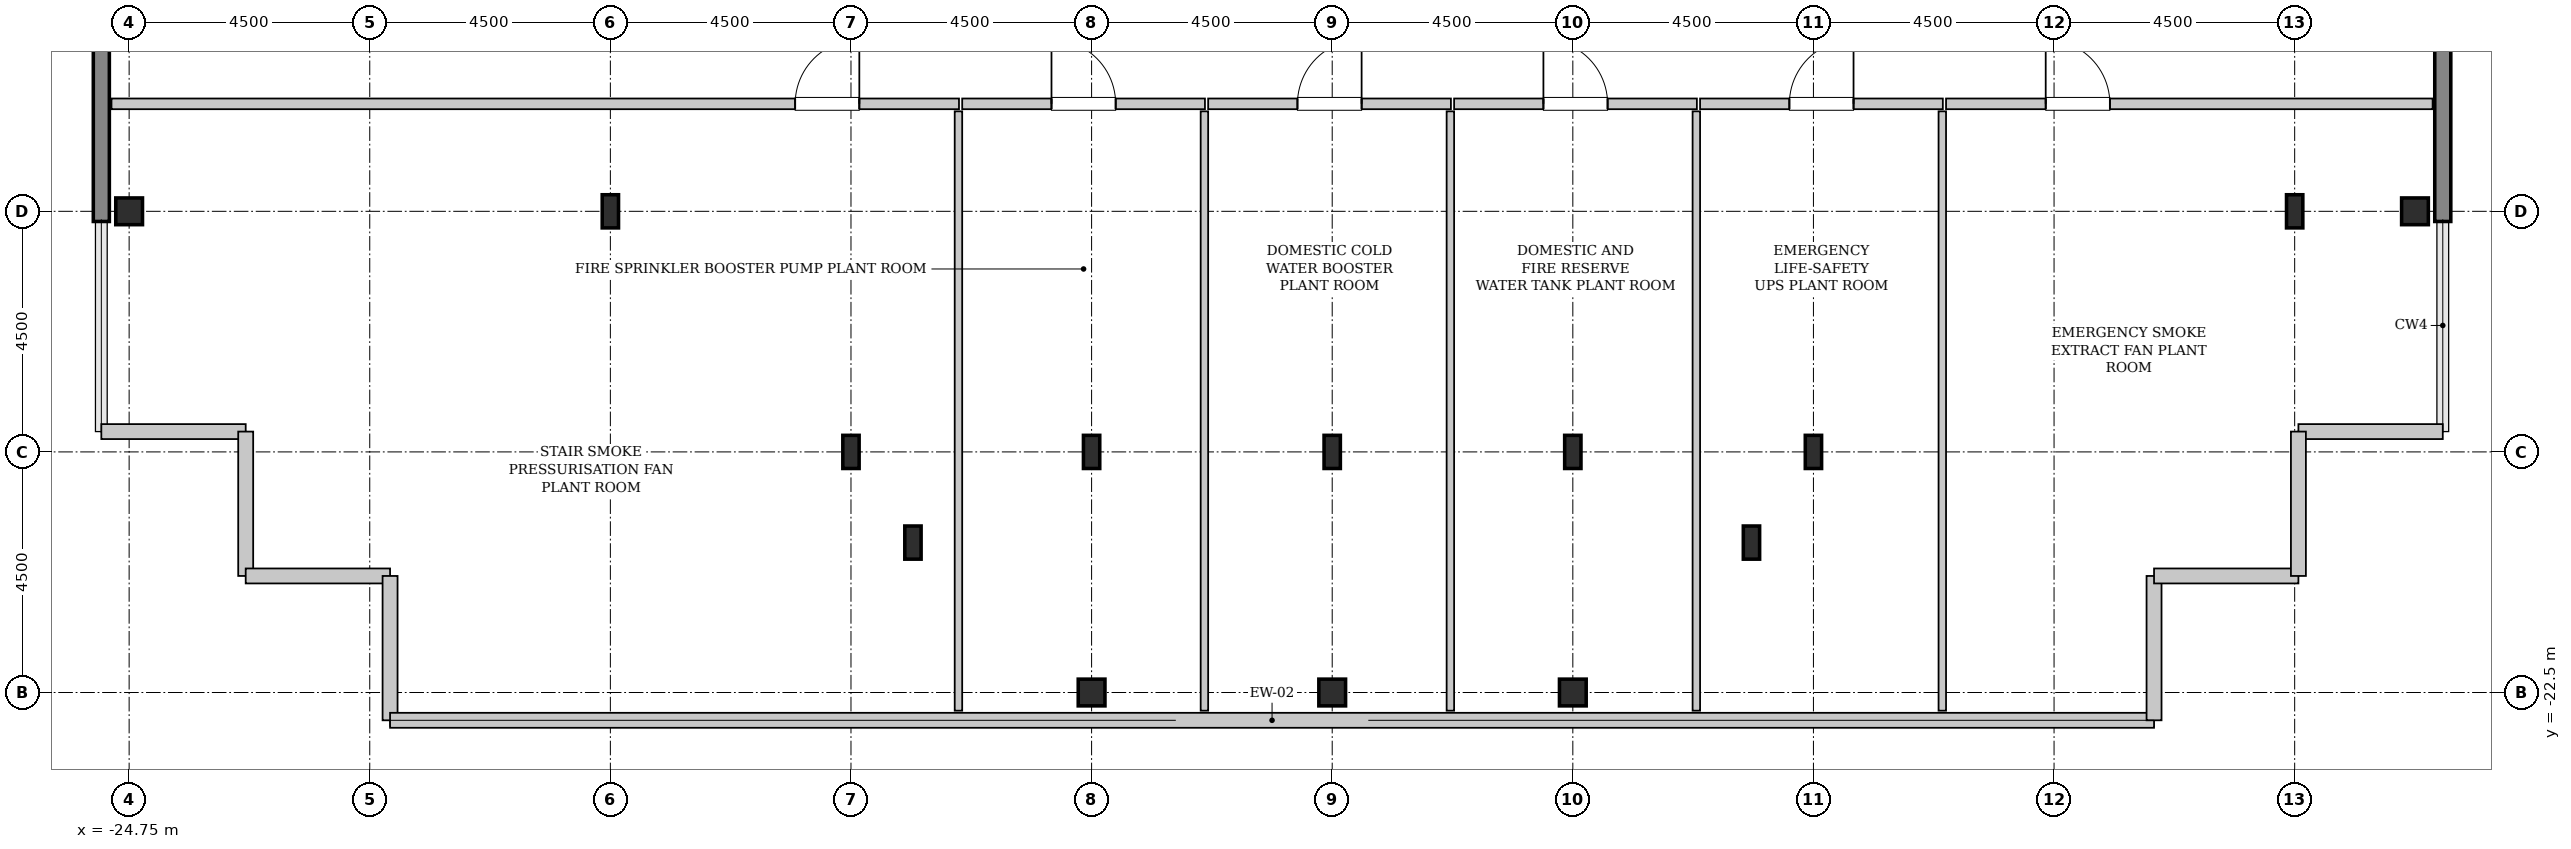
"""IFC4 building model, lengths in metres.
Left out: names, types, materials, properties, quantities, classifications, styles, units other than length and angle.
Written with IfcOpenShell. Run it as: python <this file> out.ifc"""

import sys

from ifc_helpers import new_model, si_unit, direction, frame, frame_2d, origin, origin_2d, place, context, subcontext, project, spatial, rectangle, hollow_rectangle, i_section, extrude, source, transform, mapped, element, fill, save


model = new_model("IFC4")
c1 = context("Model", 3, precision=1e-05, world=origin(), true_north=direction((0.0, 1.0)))
c2 = subcontext(c1, "Body", "Model", "MODEL_VIEW")
j1 = project(units=[si_unit("LENGTHUNIT", "METRE"), si_unit("PLANEANGLEUNIT", "RADIAN")], contexts=[c1])
p1 = place(None, origin())
s1 = spatial("IfcSite", under=j1, at=p1, CompositionType="ELEMENT")
p2 = place(p1, origin())
s2 = spatial("IfcBuilding", under=s1, at=p2, CompositionType="ELEMENT")
p3 = place(p2, frame((0.0, 0.0, 317.8)))
s3 = spatial("IfcBuildingStorey", under=s2, at=p3, CompositionType="ELEMENT", Elevation=317.8)
m1 = source(origin(), c2, "Body", "SweptSolid", [
    extrude(hollow_rectangle(XDim=0.5, YDim=0.5, WallThickness=0.025, InnerFilletRadius=0.025, OuterFilletRadius=0.05, at=origin_2d()), origin(), (0.0, 0.0, 1.0), 4.6),
])
p4 = place(p3, frame((-24.75, -13.5, 0.0), z_axis=(0.0, 0.0, 1.0), x_axis=(1.0, 0.0, 0.0)))
e1 = element("IfcColumn", 1, at=p4, inside=s3, PredefinedType="COLUMN", context=c2, shape_type="MappedRepresentation", body=[
    mapped(m1, transform((0.0, 0.0, 0.0), x_axis=(1.0, 0.0, 0.0), y_axis=(0.0, 1.0, 0.0), z_axis=(0.0, 0.0, 1.0), scale=1.0)),
])
m2 = source(origin(), c2, "Body", "SweptSolid", [
    extrude(i_section(OverallWidth=0.305, OverallDepth=0.62, WebThickness=0.021, FlangeThickness=0.04, FilletRadius=0.027, at=origin_2d()), origin(), (0.0, 0.0, 1.0), 4.6),
])
for number, where, z_axis, x_axis in (
    (2, (-15.75, -13.5, 0.0), (0.0, 0.0, 1.0), (1.0, 0.0, 0.0)),
    (3, (-11.25, -18.0, 0.0), (0.0, 0.0, 1.0), (1.0, 0.0, 0.0)),
    (4, (-10.091, -19.696, 0.0), (0.0, 0.0, 1.0), (1.0, 0.0, 0.0)),
):
    element("IfcColumn", number, at=place(p3, frame(where, z_axis=z_axis, x_axis=x_axis)), inside=s3, PredefinedType="COLUMN", context=c2, shape_type="MappedRepresentation", body=[
        mapped(m2, transform((0.0, 0.0, 0.0), x_axis=(1.0, 0.0, 0.0), y_axis=(0.0, 1.0, 0.0), z_axis=(0.0, 0.0, 1.0), scale=1.0)),
    ])
p5 = place(p3, frame((-6.75, -22.5, 0.0), z_axis=(0.0, 0.0, 1.0), x_axis=(1.0, 0.0, 0.0)))
e5 = element("IfcColumn", 5, at=p5, inside=s3, PredefinedType="COLUMN", context=c2, shape_type="MappedRepresentation", body=[
    mapped(m1, transform((0.0, 0.0, 0.0), x_axis=(1.0, 0.0, 0.0), y_axis=(0.0, 1.0, 0.0), z_axis=(0.0, 0.0, 1.0), scale=1.0)),
])
p6 = place(p3, frame((-6.75, -18.0, 0.0), z_axis=(0.0, 0.0, 1.0), x_axis=(1.0, 0.0, 0.0)))
e6 = element("IfcColumn", 6, at=p6, inside=s3, PredefinedType="COLUMN", context=c2, shape_type="MappedRepresentation", body=[
    mapped(m2, transform((0.0, 0.0, 0.0), x_axis=(1.0, 0.0, 0.0), y_axis=(0.0, 1.0, 0.0), z_axis=(0.0, 0.0, 1.0), scale=1.0)),
])
p7 = place(p3, frame((-2.25, -22.5, 0.0), z_axis=(0.0, 0.0, 1.0), x_axis=(1.0, 0.0, 0.0)))
e7 = element("IfcColumn", 7, at=p7, inside=s3, PredefinedType="COLUMN", context=c2, shape_type="MappedRepresentation", body=[
    mapped(m1, transform((0.0, 0.0, 0.0), x_axis=(1.0, 0.0, 0.0), y_axis=(0.0, 1.0, 0.0), z_axis=(0.0, 0.0, 1.0), scale=1.0)),
])
p8 = place(p3, frame((-2.25, -18.0, 0.0), z_axis=(0.0, 0.0, 1.0), x_axis=(1.0, 0.0, 0.0)))
e8 = element("IfcColumn", 8, at=p8, inside=s3, PredefinedType="COLUMN", context=c2, shape_type="MappedRepresentation", body=[
    mapped(m2, transform((0.0, 0.0, 0.0), x_axis=(1.0, 0.0, 0.0), y_axis=(0.0, 1.0, 0.0), z_axis=(0.0, 0.0, 1.0), scale=1.0)),
])
p9 = place(p3, frame((2.25, -22.5, 0.0), z_axis=(0.0, 0.0, 1.0), x_axis=(1.0, 0.0, 0.0)))
e9 = element("IfcColumn", 9, at=p9, inside=s3, PredefinedType="COLUMN", context=c2, shape_type="MappedRepresentation", body=[
    mapped(m1, transform((0.0, 0.0, 0.0), x_axis=(1.0, 0.0, 0.0), y_axis=(0.0, 1.0, 0.0), z_axis=(0.0, 0.0, 1.0), scale=1.0)),
])
for number, where, z_axis, x_axis in (
    (10, (2.25, -18.0, 0.0), (0.0, 0.0, 1.0), (1.0, 0.0, 0.0)),
    (11, (5.591, -19.696, 0.0), (0.0, 0.0, 1.0), (1.0, 0.0, 0.0)),
    (12, (6.75, -18.0, 0.0), (0.0, 0.0, 1.0), (1.0, 0.0, 0.0)),
    (13, (15.75, -13.5, 0.0), (0.0, 0.0, 1.0), (1.0, 0.0, 0.0)),
):
    element("IfcColumn", number, at=place(p3, frame(where, z_axis=z_axis, x_axis=x_axis)), inside=s3, PredefinedType="COLUMN", context=c2, shape_type="MappedRepresentation", body=[
        mapped(m2, transform((0.0, 0.0, 0.0), x_axis=(1.0, 0.0, 0.0), y_axis=(0.0, 1.0, 0.0), z_axis=(0.0, 0.0, 1.0), scale=1.0)),
    ])
p10 = place(p3, frame((18.0, -13.5, 0.0), z_axis=(0.0, 0.0, 1.0), x_axis=(1.0, 0.0, 0.0)))
e14 = element("IfcColumn", 14, at=p10, inside=s3, PredefinedType="COLUMN", context=c2, shape_type="MappedRepresentation", body=[
    mapped(m1, transform((0.0, 0.0, 0.0), x_axis=(1.0, 0.0, 0.0), y_axis=(0.0, 1.0, 0.0), z_axis=(0.0, 0.0, 1.0), scale=1.0)),
])
m3 = source(origin(), c2, "Body", "SweptSolid", [
    extrude(rectangle(XDim=9.38, YDim=0.3, at=frame_2d((4.69, 0.0))), origin(), (0.0, 0.0, 1.0), 4.35),
])
for number, where, z_axis, x_axis in (
    (15, (-25.27, -13.69, 0.0), (0.0, 0.0, 1.0), (0.0, 1.0, 0.0)),
    (16, (18.52, -13.69, 0.0), (0.0, 0.0, 1.0), (0.0, 1.0, 0.0)),
):
    element("IfcWall", number, at=place(p3, frame(where, z_axis=z_axis, x_axis=x_axis)), inside=s3, PredefinedType="SHEAR", context=c2, shape_type="MappedRepresentation", body=[
        mapped(m3, transform((0.0, 0.0, 0.0), x_axis=(1.0, 0.0, 0.0), y_axis=(0.0, 1.0, 0.0), z_axis=(0.0, 0.0, 1.0), scale=1.0)),
    ])
m4 = source(origin(), c2, "Body", "SweptSolid", [
    extrude(rectangle(XDim=2.7, YDim=0.28, at=frame_2d((1.35, 0.0))), origin(), (0.0, 0.0, 1.0), 4.35),
])
for number, where, z_axis, x_axis in (
    (17, (15.82, -17.62, 0.0), (0.0, 0.0, 1.0), (1.0, 0.0, 0.0)),
    (18, (-25.27, -17.62, 0.0), (0.0, 0.0, 1.0), (1.0, 0.0, 0.0)),
    (19, (-22.57, -17.62, 0.0), (0.0, 0.0, 1.0), (0.0, -1.0, 0.0)),
    (20, (-22.57, -20.32, 0.0), (0.0, 0.0, 1.0), (1.0, 0.0, 0.0)),
    (21, (-19.87, -20.32, 0.0), (0.0, 0.0, 1.0), (0.0, -1.0, 0.0)),
):
    element("IfcWall", number, at=place(p3, frame(where, z_axis=z_axis, x_axis=x_axis)), inside=s3, PredefinedType="SOLIDWALL", context=c2, shape_type="MappedRepresentation", body=[
        mapped(m4, transform((0.0, 0.0, 0.0), x_axis=(1.0, 0.0, 0.0), y_axis=(0.0, 1.0, 0.0), z_axis=(0.0, 0.0, 1.0), scale=1.0)),
    ])
m5 = source(origin(), c2, "Body", "SweptSolid", [
    extrude(rectangle(XDim=32.99, YDim=0.28, at=frame_2d((16.495, 0.0))), origin(), (0.0, 0.0, 1.0), 1.1),
])
p11 = place(p3, frame((-19.87, -23.02, 0.0), z_axis=(0.0, 0.0, 1.0), x_axis=(1.0, 0.0, 0.0)))
e22 = element("IfcWall", 22, at=p11, inside=s3, PredefinedType="SOLIDWALL", context=c2, shape_type="MappedRepresentation", body=[
    mapped(m5, transform((0.0, 0.0, 0.0), x_axis=(1.0, 0.0, 0.0), y_axis=(0.0, 1.0, 0.0), z_axis=(0.0, 0.0, 1.0), scale=1.0)),
])
for number, where, z_axis, x_axis in (
    (23, (13.12, -23.02, 0.0), (0.0, 0.0, 1.0), (0.0, 1.0, 0.0)),
    (24, (13.12, -20.32, 0.0), (0.0, 0.0, 1.0), (1.0, 0.0, 0.0)),
    (25, (15.82, -20.32, 0.0), (0.0, 0.0, 1.0), (0.0, 1.0, 0.0)),
):
    element("IfcWall", number, at=place(p3, frame(where, z_axis=z_axis, x_axis=x_axis)), inside=s3, PredefinedType="SOLIDWALL", context=c2, shape_type="MappedRepresentation", body=[
        mapped(m4, transform((0.0, 0.0, 0.0), x_axis=(1.0, 0.0, 0.0), y_axis=(0.0, 1.0, 0.0), z_axis=(0.0, 0.0, 1.0), scale=1.0)),
    ])
m6 = source(origin(), c2, "Body", "SweptSolid", [
    extrude(rectangle(XDim=15.85, YDim=0.2, at=frame_2d((7.925, 0.0))), origin(), (0.0, 0.0, 1.0), 4.335),
])
p12 = place(p3, frame((-25.08, -11.49, 0.0), z_axis=(0.0, 0.0, 1.0), x_axis=(1.0, 0.0, 0.0)))
e26 = element("IfcWall", 26, at=p12, inside=s3, PredefinedType="SOLIDWALL", context=c2, shape_type="MappedRepresentation", body=[
    mapped(m6, transform((0.0, 0.0, 0.0), x_axis=(1.0, 0.0, 0.0), y_axis=(0.0, 1.0, 0.0), z_axis=(0.0, 0.0, 1.0), scale=1.0)),
])
p13 = place(p12, frame((12.786, 0.0, 0.0)))
e27 = element("IfcOpeningElement", 27, at=p13, cuts=e26, PredefinedType="OPENING", context=c2, shape_type="SweptSolid", body=[
    extrude(rectangle(XDim=1.2, YDim=2.15, at=frame_2d((0.6, 1.075))), frame((0.0, 0.11, 0.0), z_axis=(0.0, -1.0, 0.0), x_axis=(1.0, 0.0, 0.0)), (0.0, 0.0, 1.0), 0.22),
])
m7 = source(origin(), c2, "Body", "SweptSolid", [
    extrude(rectangle(XDim=11.21, YDim=0.14, at=frame_2d((5.605, 0.0))), origin(), (0.0, 0.0, 1.0), 4.335),
])
p14 = place(p3, frame((-9.24, -22.84, 0.0), z_axis=(0.0, 0.0, 1.0), x_axis=(0.0, 1.0, 0.0)))
e28 = element("IfcWall", 28, at=p14, inside=s3, PredefinedType="PARTITIONING", context=c2, shape_type="MappedRepresentation", body=[
    mapped(m7, transform((0.0, 0.0, 0.0), x_axis=(1.0, 0.0, 0.0), y_axis=(0.0, 1.0, 0.0), z_axis=(0.0, 0.0, 1.0), scale=1.0)),
])
m8 = source(origin(), c2, "Body", "SweptSolid", [
    extrude(rectangle(XDim=4.54, YDim=0.2, at=frame_2d((2.27, 0.0))), origin(), (0.0, 0.0, 1.0), 4.335),
])
p15 = place(p3, frame((-9.17, -11.49, 0.0), z_axis=(0.0, 0.0, 1.0), x_axis=(1.0, 0.0, 0.0)))
e29 = element("IfcWall", 29, at=p15, inside=s3, PredefinedType="SOLIDWALL", context=c2, shape_type="MappedRepresentation", body=[
    mapped(m8, transform((0.0, 0.0, 0.0), x_axis=(1.0, 0.0, 0.0), y_axis=(0.0, 1.0, 0.0), z_axis=(0.0, 0.0, 1.0), scale=1.0)),
])
p16 = place(p15, frame((1.67, 0.0, 0.0)))
e30 = element("IfcOpeningElement", 30, at=p16, cuts=e29, PredefinedType="OPENING", context=c2, shape_type="SweptSolid", body=[
    extrude(rectangle(XDim=1.2, YDim=2.15, at=frame_2d((0.6, 1.075))), frame((0.0, 0.11, 0.0), z_axis=(0.0, -1.0, 0.0), x_axis=(1.0, 0.0, 0.0)), (0.0, 0.0, 1.0), 0.22),
])
p17 = place(p3, frame((-4.64, -22.84, 0.0), z_axis=(0.0, 0.0, 1.0), x_axis=(0.0, 1.0, 0.0)))
e31 = element("IfcWall", 31, at=p17, inside=s3, PredefinedType="PARTITIONING", context=c2, shape_type="MappedRepresentation", body=[
    mapped(m7, transform((0.0, 0.0, 0.0), x_axis=(1.0, 0.0, 0.0), y_axis=(0.0, 1.0, 0.0), z_axis=(0.0, 0.0, 1.0), scale=1.0)),
])
p18 = place(p3, frame((-4.57, -11.49, 0.0), z_axis=(0.0, 0.0, 1.0), x_axis=(1.0, 0.0, 0.0)))
e32 = element("IfcWall", 32, at=p18, inside=s3, PredefinedType="SOLIDWALL", context=c2, shape_type="MappedRepresentation", body=[
    mapped(m8, transform((0.0, 0.0, 0.0), x_axis=(1.0, 0.0, 0.0), y_axis=(0.0, 1.0, 0.0), z_axis=(0.0, 0.0, 1.0), scale=1.0)),
])
p19 = place(p18, frame((1.67, 0.0, 0.0)))
e33 = element("IfcOpeningElement", 33, at=p19, cuts=e32, PredefinedType="OPENING", context=c2, shape_type="SweptSolid", body=[
    extrude(rectangle(XDim=1.2, YDim=2.15, at=frame_2d((0.6, 1.075))), frame((0.0, 0.11, 0.0), z_axis=(0.0, -1.0, 0.0), x_axis=(1.0, 0.0, 0.0)), (0.0, 0.0, 1.0), 0.22),
])
p20 = place(p3, frame((-0.04, -22.84, 0.0), z_axis=(0.0, 0.0, 1.0), x_axis=(0.0, 1.0, 0.0)))
e34 = element("IfcWall", 34, at=p20, inside=s3, PredefinedType="PARTITIONING", context=c2, shape_type="MappedRepresentation", body=[
    mapped(m7, transform((0.0, 0.0, 0.0), x_axis=(1.0, 0.0, 0.0), y_axis=(0.0, 1.0, 0.0), z_axis=(0.0, 0.0, 1.0), scale=1.0)),
])
p21 = place(p3, frame((0.03, -11.49, 0.0), z_axis=(0.0, 0.0, 1.0), x_axis=(1.0, 0.0, 0.0)))
e35 = element("IfcWall", 35, at=p21, inside=s3, PredefinedType="SOLIDWALL", context=c2, shape_type="MappedRepresentation", body=[
    mapped(m8, transform((0.0, 0.0, 0.0), x_axis=(1.0, 0.0, 0.0), y_axis=(0.0, 1.0, 0.0), z_axis=(0.0, 0.0, 1.0), scale=1.0)),
])
p22 = place(p21, frame((1.67, 0.0, 0.0)))
e36 = element("IfcOpeningElement", 36, at=p22, cuts=e35, PredefinedType="OPENING", context=c2, shape_type="SweptSolid", body=[
    extrude(rectangle(XDim=1.2, YDim=2.15, at=frame_2d((0.6, 1.075))), frame((0.0, 0.11, 0.0), z_axis=(0.0, -1.0, 0.0), x_axis=(1.0, 0.0, 0.0)), (0.0, 0.0, 1.0), 0.22),
])
p23 = place(p3, frame((4.56, -22.84, 0.0), z_axis=(0.0, 0.0, 1.0), x_axis=(0.0, 1.0, 0.0)))
e37 = element("IfcWall", 37, at=p23, inside=s3, PredefinedType="PARTITIONING", context=c2, shape_type="MappedRepresentation", body=[
    mapped(m7, transform((0.0, 0.0, 0.0), x_axis=(1.0, 0.0, 0.0), y_axis=(0.0, 1.0, 0.0), z_axis=(0.0, 0.0, 1.0), scale=1.0)),
])
p24 = place(p3, frame((4.63, -11.49, 0.0), z_axis=(0.0, 0.0, 1.0), x_axis=(1.0, 0.0, 0.0)))
e38 = element("IfcWall", 38, at=p24, inside=s3, PredefinedType="SOLIDWALL", context=c2, shape_type="MappedRepresentation", body=[
    mapped(m8, transform((0.0, 0.0, 0.0), x_axis=(1.0, 0.0, 0.0), y_axis=(0.0, 1.0, 0.0), z_axis=(0.0, 0.0, 1.0), scale=1.0)),
])
p25 = place(p24, frame((1.67, 0.0, 0.0)))
e39 = element("IfcOpeningElement", 39, at=p25, cuts=e38, PredefinedType="OPENING", context=c2, shape_type="SweptSolid", body=[
    extrude(rectangle(XDim=1.2, YDim=2.15, at=frame_2d((0.6, 1.075))), frame((0.0, 0.11, 0.0), z_axis=(0.0, -1.0, 0.0), x_axis=(1.0, 0.0, 0.0)), (0.0, 0.0, 1.0), 0.22),
])
p26 = place(p3, frame((9.16, -22.84, 0.0), z_axis=(0.0, 0.0, 1.0), x_axis=(0.0, 1.0, 0.0)))
e40 = element("IfcWall", 40, at=p26, inside=s3, PredefinedType="PARTITIONING", context=c2, shape_type="MappedRepresentation", body=[
    mapped(m7, transform((0.0, 0.0, 0.0), x_axis=(1.0, 0.0, 0.0), y_axis=(0.0, 1.0, 0.0), z_axis=(0.0, 0.0, 1.0), scale=1.0)),
])
m9 = source(origin(), c2, "Body", "SweptSolid", [
    extrude(rectangle(XDim=9.1, YDim=0.2, at=frame_2d((4.55, 0.0))), origin(), (0.0, 0.0, 1.0), 4.335),
])
p27 = place(p3, frame((9.23, -11.49, 0.0), z_axis=(0.0, 0.0, 1.0), x_axis=(1.0, 0.0, 0.0)))
e41 = element("IfcWall", 41, at=p27, inside=s3, PredefinedType="SOLIDWALL", context=c2, shape_type="MappedRepresentation", body=[
    mapped(m9, transform((0.0, 0.0, 0.0), x_axis=(1.0, 0.0, 0.0), y_axis=(0.0, 1.0, 0.0), z_axis=(0.0, 0.0, 1.0), scale=1.0)),
])
p28 = place(p27, frame((1.864, 0.0, 0.0)))
e42 = element("IfcOpeningElement", 42, at=p28, cuts=e41, PredefinedType="OPENING", context=c2, shape_type="SweptSolid", body=[
    extrude(rectangle(XDim=1.2, YDim=2.15, at=frame_2d((0.6, 1.075))), frame((0.0, 0.11, 0.0), z_axis=(0.0, -1.0, 0.0), x_axis=(1.0, 0.0, 0.0)), (0.0, 0.0, 1.0), 0.22),
])
m10 = source(origin(), c2, "Body", "SweptSolid", [
    extrude(rectangle(XDim=1.2, YDim=2.15, at=frame_2d((0.6, 1.075))), frame((0.0, 0.025, 0.0), z_axis=(0.0, -1.0, 0.0), x_axis=(1.0, 0.0, 0.0)), (0.0, 0.0, 1.0), 0.05),
])
p29 = place(p13, origin())
e43 = element("IfcDoor", 43, at=p29, inside=s3, OperationType="SINGLE_SWING_RIGHT", PredefinedType="DOOR", context=c2, shape_type="MappedRepresentation", body=[
    mapped(m10, transform((0.0, 0.0, 0.0), x_axis=(1.0, 0.0, 0.0), y_axis=(0.0, 1.0, 0.0), z_axis=(0.0, 0.0, 1.0), scale=1.0)),
])
fill(e27, e43)
p30 = place(p16, origin())
e44 = element("IfcDoor", 44, at=p30, inside=s3, OperationType="SINGLE_SWING_LEFT", PredefinedType="DOOR", context=c2, shape_type="MappedRepresentation", body=[
    mapped(m10, transform((0.0, 0.0, 0.0), x_axis=(1.0, 0.0, 0.0), y_axis=(0.0, 1.0, 0.0), z_axis=(0.0, 0.0, 1.0), scale=1.0)),
])
fill(e30, e44)
p31 = place(p19, origin())
e45 = element("IfcDoor", 45, at=p31, inside=s3, OperationType="SINGLE_SWING_RIGHT", PredefinedType="DOOR", context=c2, shape_type="MappedRepresentation", body=[
    mapped(m10, transform((0.0, 0.0, 0.0), x_axis=(1.0, 0.0, 0.0), y_axis=(0.0, 1.0, 0.0), z_axis=(0.0, 0.0, 1.0), scale=1.0)),
])
fill(e33, e45)
p32 = place(p22, origin())
e46 = element("IfcDoor", 46, at=p32, inside=s3, OperationType="SINGLE_SWING_LEFT", PredefinedType="DOOR", context=c2, shape_type="MappedRepresentation", body=[
    mapped(m10, transform((0.0, 0.0, 0.0), x_axis=(1.0, 0.0, 0.0), y_axis=(0.0, 1.0, 0.0), z_axis=(0.0, 0.0, 1.0), scale=1.0)),
])
fill(e36, e46)
p33 = place(p25, origin())
e47 = element("IfcDoor", 47, at=p33, inside=s3, OperationType="SINGLE_SWING_RIGHT", PredefinedType="DOOR", context=c2, shape_type="MappedRepresentation", body=[
    mapped(m10, transform((0.0, 0.0, 0.0), x_axis=(1.0, 0.0, 0.0), y_axis=(0.0, 1.0, 0.0), z_axis=(0.0, 0.0, 1.0), scale=1.0)),
])
fill(e39, e47)
p34 = place(p28, origin())
e48 = element("IfcDoor", 48, at=p34, inside=s3, OperationType="SINGLE_SWING_LEFT", PredefinedType="DOOR", context=c2, shape_type="MappedRepresentation", body=[
    mapped(m10, transform((0.0, 0.0, 0.0), x_axis=(1.0, 0.0, 0.0), y_axis=(0.0, 1.0, 0.0), z_axis=(0.0, 0.0, 1.0), scale=1.0)),
])
fill(e42, e48)
save(model, sys.argv[1])
